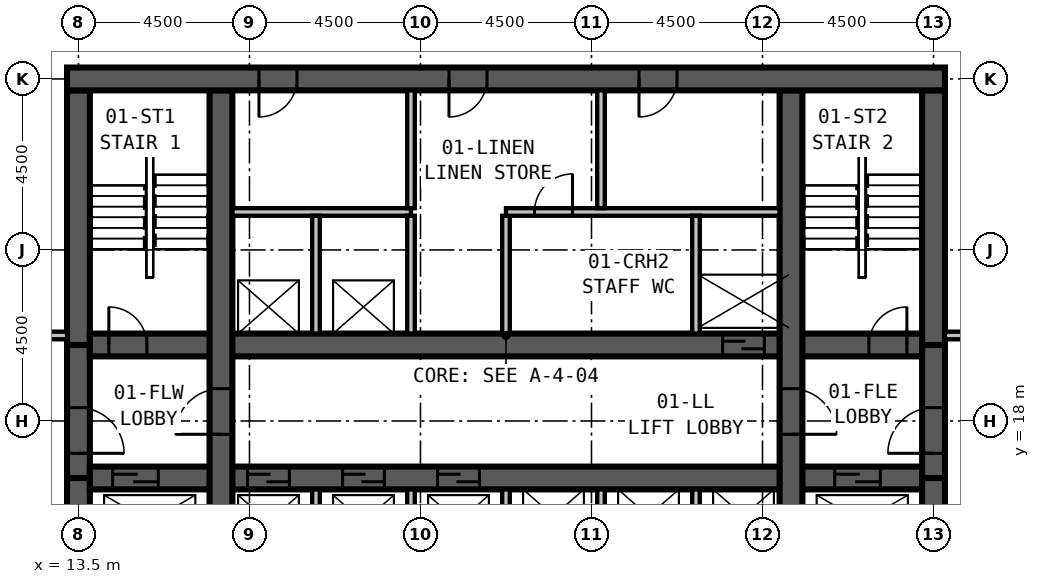
"""IFC4 building model, lengths in metres.
Left out: names, types, materials, properties, quantities, classifications, styles, units other than length and angle.
Written with IfcOpenShell. Run it as: python <this file> out.ifc"""

import sys

from ifc_helpers import new_model, si_unit, direction, frame, frame_2d, origin, place, context, subcontext, project, spatial, rectangle, extrude, element, fill, save


model = new_model("IFC4")
c1 = context("Model", 3, precision=1e-05, world=origin(), true_north=direction((0.0, 1.0)))
c2 = subcontext(c1, "Body", "Model", "MODEL_VIEW")
j1 = project(units=[si_unit("LENGTHUNIT", "METRE"), si_unit("PLANEANGLEUNIT", "RADIAN")], contexts=[c1])
p1 = place(None, origin())
s1 = spatial("IfcSite", under=j1, at=p1, CompositionType="ELEMENT")
p2 = place(p1, origin())
s2 = spatial("IfcBuilding", under=s1, at=p2, CompositionType="ELEMENT")
p3 = place(p2, frame((0.0, 0.0, 6.0)))
s3 = spatial("IfcBuildingStorey", under=s2, at=p3, CompositionType="ELEMENT", Elevation=6.0)
p4 = place(p3, frame((36.3, 27.0, 0.0), z_axis=(0.0, 0.0, 1.0), x_axis=(-1.0, 0.0, 0.0)))
e1 = element("IfcWall", 1, at=p4, inside=s3, PredefinedType="SHEAR", context=c2, shape_type="SweptSolid", body=[
    extrude(rectangle(XDim=23.1, YDim=0.6, at=frame_2d((11.55, 0.0))), origin(), (0.0, 0.0, 1.0), 5.0),
])
p5 = place(p4, frame((17.05, 0.0, 0.0)))
e2 = element("IfcOpeningElement", 2, at=p5, cuts=e1, PredefinedType="OPENING", context=c2, shape_type="SweptSolid", body=[
    extrude(rectangle(XDim=1.0, YDim=2.1, at=frame_2d((0.5, 1.05))), frame((0.0, 0.31, 0.0), z_axis=(0.0, -1.0, 0.0), x_axis=(1.0, 0.0, 0.0)), (0.0, 0.0, 1.0), 0.62),
])
p6 = place(p4, frame((12.05, 0.0, 0.0)))
e3 = element("IfcOpeningElement", 3, at=p6, cuts=e1, PredefinedType="OPENING", context=c2, shape_type="SweptSolid", body=[
    extrude(rectangle(XDim=1.0, YDim=2.1, at=frame_2d((0.5, 1.05))), frame((0.0, 0.31, 0.0), z_axis=(0.0, -1.0, 0.0), x_axis=(1.0, 0.0, 0.0)), (0.0, 0.0, 1.0), 0.62),
])
p7 = place(p4, frame((7.05, 0.0, 0.0)))
e4 = element("IfcOpeningElement", 4, at=p7, cuts=e1, PredefinedType="OPENING", context=c2, shape_type="SweptSolid", body=[
    extrude(rectangle(XDim=1.0, YDim=2.1, at=frame_2d((0.5, 1.05))), frame((0.0, 0.31, 0.0), z_axis=(0.0, -1.0, 0.0), x_axis=(1.0, 0.0, 0.0)), (0.0, 0.0, 1.0), 0.62),
])
p8 = place(p3, frame((17.25, 13.8, 0.0), z_axis=(0.0, 0.0, 1.0), x_axis=(0.0, 1.0, 0.0)))
e5 = element("IfcWall", 5, at=p8, inside=s3, PredefinedType="SHEAR", context=c2, shape_type="SweptSolid", body=[
    extrude(rectangle(XDim=12.9, YDim=0.6, at=frame_2d((6.45, 0.0))), origin(), (0.0, 0.0, 1.0), 5.0),
])
p9 = place(p8, frame((3.85, 0.0, 0.0)))
e6 = element("IfcOpeningElement", 6, at=p9, cuts=e5, PredefinedType="OPENING", context=c2, shape_type="SweptSolid", body=[
    extrude(rectangle(XDim=1.2, YDim=2.1, at=frame_2d((0.6, 1.05))), frame((0.0, 0.31, 0.0), z_axis=(0.0, -1.0, 0.0), x_axis=(1.0, 0.0, 0.0)), (0.0, 0.0, 1.0), 0.62),
])
p10 = place(p3, frame((32.25, 13.8, 0.0), z_axis=(0.0, 0.0, 1.0), x_axis=(0.0, 1.0, 0.0)))
e7 = element("IfcWall", 7, at=p10, inside=s3, PredefinedType="SHEAR", context=c2, shape_type="SweptSolid", body=[
    extrude(rectangle(XDim=12.9, YDim=0.6, at=frame_2d((6.45, 0.0))), origin(), (0.0, 0.0, 1.0), 5.0),
])
p11 = place(p10, frame((5.05, 0.0, 0.0), z_axis=(0.0, 0.0, 1.0), x_axis=(-1.0, 0.0, 0.0)))
e8 = element("IfcOpeningElement", 8, at=p11, cuts=e7, PredefinedType="OPENING", context=c2, shape_type="SweptSolid", body=[
    extrude(rectangle(XDim=1.2, YDim=2.1, at=frame_2d((0.6, 1.05))), frame((0.0, 0.31, 0.0), z_axis=(0.0, -1.0, 0.0), x_axis=(1.0, 0.0, 0.0)), (0.0, 0.0, 1.0), 0.62),
])
p12 = place(p3, frame((13.8, 16.5, 0.0), z_axis=(0.0, 0.0, 1.0), x_axis=(1.0, 0.0, 0.0)))
e9 = element("IfcWall", 9, at=p12, inside=s3, PredefinedType="SHEAR", context=c2, shape_type="SweptSolid", body=[
    extrude(rectangle(XDim=21.9, YDim=0.6, at=frame_2d((10.95, 0.0))), origin(), (0.0, 0.0, 1.0), 5.0),
])
p13 = place(p12, frame((4.15, 0.0, 0.0)))
e10 = element("IfcOpeningElement", 10, at=p13, cuts=e9, PredefinedType="OPENING", context=c2, shape_type="SweptSolid", body=[
    extrude(rectangle(XDim=1.1, YDim=2.1, at=frame_2d((0.55, 1.05))), frame((0.0, 0.31, 0.0), z_axis=(0.0, -1.0, 0.0), x_axis=(1.0, 0.0, 0.0)), (0.0, 0.0, 1.0), 0.62),
])
p14 = place(p12, frame((6.65, 0.0, 0.0)))
e11 = element("IfcOpeningElement", 11, at=p14, cuts=e9, PredefinedType="OPENING", context=c2, shape_type="SweptSolid", body=[
    extrude(rectangle(XDim=1.1, YDim=2.1, at=frame_2d((0.55, 1.05))), frame((0.0, 0.31, 0.0), z_axis=(0.0, -1.0, 0.0), x_axis=(1.0, 0.0, 0.0)), (0.0, 0.0, 1.0), 0.62),
])
p15 = place(p12, frame((9.15, 0.0, 0.0)))
e12 = element("IfcOpeningElement", 12, at=p15, cuts=e9, PredefinedType="OPENING", context=c2, shape_type="SweptSolid", body=[
    extrude(rectangle(XDim=1.1, YDim=2.1, at=frame_2d((0.55, 1.05))), frame((0.0, 0.31, 0.0), z_axis=(0.0, -1.0, 0.0), x_axis=(1.0, 0.0, 0.0)), (0.0, 0.0, 1.0), 0.62),
])
p16 = place(p12, frame((0.6, 0.0, 0.0)))
e13 = element("IfcOpeningElement", 13, at=p16, cuts=e9, PredefinedType="OPENING", context=c2, shape_type="SweptSolid", body=[
    extrude(rectangle(XDim=1.2, YDim=2.1, at=frame_2d((0.6, 1.05))), frame((0.0, 0.31, 0.0), z_axis=(0.0, -1.0, 0.0), x_axis=(1.0, 0.0, 0.0)), (0.0, 0.0, 1.0), 0.62),
])
p17 = place(p12, frame((19.6, 0.0, 0.0)))
e14 = element("IfcOpeningElement", 14, at=p17, cuts=e9, PredefinedType="OPENING", context=c2, shape_type="SweptSolid", body=[
    extrude(rectangle(XDim=1.2, YDim=2.1, at=frame_2d((0.6, 1.05))), frame((0.0, 0.31, 0.0), z_axis=(0.0, -1.0, 0.0), x_axis=(1.0, 0.0, 0.0)), (0.0, 0.0, 1.0), 0.62),
])
p18 = place(p3, frame((13.8, 20.0, 0.0), z_axis=(0.0, 0.0, 1.0), x_axis=(1.0, 0.0, 0.0)))
e15 = element("IfcWall", 15, at=p18, inside=s3, PredefinedType="SHEAR", context=c2, shape_type="SweptSolid", body=[
    extrude(rectangle(XDim=21.9, YDim=0.6, at=frame_2d((10.95, 0.0))), origin(), (0.0, 0.0, 1.0), 5.0),
])
p19 = place(p18, frame((0.5, 0.0, 0.0)))
e16 = element("IfcOpeningElement", 16, at=p19, cuts=e15, PredefinedType="OPENING", context=c2, shape_type="SweptSolid", body=[
    extrude(rectangle(XDim=1.0, YDim=2.1, at=frame_2d((0.5, 1.05))), frame((0.0, 0.31, 0.0), z_axis=(0.0, -1.0, 0.0), x_axis=(1.0, 0.0, 0.0)), (0.0, 0.0, 1.0), 0.62),
])
p20 = place(p18, frame((20.5, 0.0, 0.0)))
e17 = element("IfcOpeningElement", 17, at=p20, cuts=e15, PredefinedType="OPENING", context=c2, shape_type="SweptSolid", body=[
    extrude(rectangle(XDim=1.0, YDim=2.1, at=frame_2d((0.5, 1.05))), frame((0.0, 0.31, 0.0), z_axis=(0.0, -1.0, 0.0), x_axis=(1.0, 0.0, 0.0)), (0.0, 0.0, 1.0), 0.62),
])
p21 = place(p18, frame((16.65, 0.0, 0.0)))
e18 = element("IfcOpeningElement", 18, at=p21, cuts=e15, PredefinedType="OPENING", context=c2, shape_type="SweptSolid", body=[
    extrude(rectangle(XDim=1.1, YDim=2.1, at=frame_2d((0.55, 1.05))), frame((0.0, 0.31, 0.0), z_axis=(0.0, -1.0, 0.0), x_axis=(1.0, 0.0, 0.0)), (0.0, 0.0, 1.0), 0.62),
])
p22 = place(p3, frame((13.5, 26.7, 0.0), z_axis=(0.0, 0.0, 1.0), x_axis=(0.0, -1.0, 0.0)))
e19 = element("IfcWall", 19, at=p22, inside=s3, PredefinedType="SHEAR", context=c2, shape_type="SweptSolid", body=[
    extrude(rectangle(XDim=6.7, YDim=0.6, at=frame_2d((3.35, 0.0))), origin(), (0.0, 0.0, 1.0), 5.0),
])
p23 = place(p3, frame((13.5, 20.0, 0.0), z_axis=(0.0, 0.0, 1.0), x_axis=(0.0, -1.0, 0.0)))
e20 = element("IfcWall", 20, at=p23, inside=s3, PredefinedType="SHEAR", context=c2, shape_type="SweptSolid", body=[
    extrude(rectangle(XDim=3.5, YDim=0.6, at=frame_2d((1.75, 0.0))), origin(), (0.0, 0.0, 1.0), 5.0),
])
p24 = place(p23, frame((1.65, 0.0, 0.0)))
e21 = element("IfcOpeningElement", 21, at=p24, cuts=e20, PredefinedType="OPENING", context=c2, shape_type="SweptSolid", body=[
    extrude(rectangle(XDim=1.2, YDim=2.1, at=frame_2d((0.6, 1.05))), frame((0.0, 0.31, 0.0), z_axis=(0.0, -1.0, 0.0), x_axis=(1.0, 0.0, 0.0)), (0.0, 0.0, 1.0), 0.62),
])
for number, where, z_axis, x_axis in (
    (22, (13.5, 16.5, 0.0), (0.0, 0.0, 1.0), (0.0, -1.0, 0.0)),
    (23, (36.0, 13.8, 0.0), (0.0, 0.0, 1.0), (0.0, 1.0, 0.0)),
):
    element("IfcWall", number, at=place(p3, frame(where, z_axis=z_axis, x_axis=x_axis)), inside=s3, PredefinedType="SHEAR", context=c2, shape_type="SweptSolid", body=[
        extrude(rectangle(XDim=2.7, YDim=0.6, at=frame_2d((1.35, 0.0))), origin(), (0.0, 0.0, 1.0), 5.0),
    ])
p25 = place(p3, frame((36.0, 16.5, 0.0), z_axis=(0.0, 0.0, 1.0), x_axis=(0.0, 1.0, 0.0)))
e24 = element("IfcWall", 24, at=p25, inside=s3, PredefinedType="SHEAR", context=c2, shape_type="SweptSolid", body=[
    extrude(rectangle(XDim=3.5, YDim=0.6, at=frame_2d((1.75, 0.0))), origin(), (0.0, 0.0, 1.0), 5.0),
])
p26 = place(p25, frame((0.65, 0.0, 0.0)))
e25 = element("IfcOpeningElement", 25, at=p26, cuts=e24, PredefinedType="OPENING", context=c2, shape_type="SweptSolid", body=[
    extrude(rectangle(XDim=1.2, YDim=2.1, at=frame_2d((0.6, 1.05))), frame((0.0, 0.31, 0.0), z_axis=(0.0, -1.0, 0.0), x_axis=(1.0, 0.0, 0.0)), (0.0, 0.0, 1.0), 0.62),
])
p27 = place(p3, frame((36.0, 20.0, 0.0), z_axis=(0.0, 0.0, 1.0), x_axis=(0.0, 1.0, 0.0)))
e26 = element("IfcWall", 26, at=p27, inside=s3, PredefinedType="SHEAR", context=c2, shape_type="SweptSolid", body=[
    extrude(rectangle(XDim=6.7, YDim=0.6, at=frame_2d((3.35, 0.0))), origin(), (0.0, 0.0, 1.0), 5.0),
])
p28 = place(p3, frame((-0.9, 20.25, 0.0), z_axis=(0.0, 0.0, 1.0), x_axis=(1.0, 0.0, 0.0)))
e27 = element("IfcWall", 27, at=p28, inside=s3, PredefinedType="PARTITIONING", context=c2, shape_type="SweptSolid", body=[
    extrude(rectangle(XDim=14.1, YDim=0.2, at=frame_2d((7.05, 0.0))), origin(), (0.0, 0.0, 1.0), 4.7),
])
p29 = place(p28, frame((5.0, 0.0, 0.0)))
e28 = element("IfcOpeningElement", 28, at=p29, cuts=e27, PredefinedType="OPENING", context=c2, shape_type="SweptSolid", body=[
    extrude(rectangle(XDim=1.8, YDim=2.4, at=frame_2d((0.9, 1.2))), frame((0.0, 0.11, 0.0), z_axis=(0.0, -1.0, 0.0), x_axis=(1.0, 0.0, 0.0)), (0.0, 0.0, 1.0), 0.22),
])
p30 = place(p3, frame((36.3, 20.25, 0.0), z_axis=(0.0, 0.0, 1.0), x_axis=(1.0, 0.0, 0.0)))
e29 = element("IfcWall", 29, at=p30, inside=s3, PredefinedType="PARTITIONING", context=c2, shape_type="SweptSolid", body=[
    extrude(rectangle(XDim=13.2, YDim=0.2, at=frame_2d((6.6, 0.0))), origin(), (0.0, 0.0, 1.0), 4.7),
])
p31 = place(p30, frame((4.0, 0.0, 0.0)))
e30 = element("IfcOpeningElement", 30, at=p31, cuts=e29, PredefinedType="OPENING", context=c2, shape_type="SweptSolid", body=[
    extrude(rectangle(XDim=1.8, YDim=2.4, at=frame_2d((0.9, 1.2))), frame((0.0, 0.11, 0.0), z_axis=(0.0, -1.0, 0.0), x_axis=(1.0, 0.0, 0.0)), (0.0, 0.0, 1.0), 0.22),
])
p32 = place(p3, frame((19.75, 13.8, 0.0), z_axis=(0.0, 0.0, 1.0), x_axis=(0.0, 1.0, 0.0)))
e31 = element("IfcWall", 31, at=p32, inside=s3, PredefinedType="PARTITIONING", context=c2, shape_type="SweptSolid", body=[
    extrude(rectangle(XDim=2.4, YDim=0.2, at=frame_2d((1.2, 0.0))), origin(), (0.0, 0.0, 1.0), 4.7),
])
p33 = place(p3, frame((19.75, 20.3, 0.0), z_axis=(0.0, 0.0, 1.0), x_axis=(0.0, 1.0, 0.0)))
e32 = element("IfcWall", 32, at=p33, inside=s3, PredefinedType="PARTITIONING", context=c2, shape_type="SweptSolid", body=[
    extrude(rectangle(XDim=3.1, YDim=0.2, at=frame_2d((1.55, 0.0))), origin(), (0.0, 0.0, 1.0), 4.7),
])
p34 = place(p3, frame((22.25, 13.8, 0.0), z_axis=(0.0, 0.0, 1.0), x_axis=(0.0, 1.0, 0.0)))
e33 = element("IfcWall", 33, at=p34, inside=s3, PredefinedType="PARTITIONING", context=c2, shape_type="SweptSolid", body=[
    extrude(rectangle(XDim=2.4, YDim=0.2, at=frame_2d((1.2, 0.0))), origin(), (0.0, 0.0, 1.0), 4.7),
])
p35 = place(p3, frame((22.25, 20.3, 0.0), z_axis=(0.0, 0.0, 1.0), x_axis=(0.0, 1.0, 0.0)))
e34 = element("IfcWall", 34, at=p35, inside=s3, PredefinedType="PARTITIONING", context=c2, shape_type="SweptSolid", body=[
    extrude(rectangle(XDim=3.1, YDim=0.2, at=frame_2d((1.55, 0.0))), origin(), (0.0, 0.0, 1.0), 4.7),
])
p36 = place(p3, frame((24.75, 13.8, 0.0), z_axis=(0.0, 0.0, 1.0), x_axis=(0.0, 1.0, 0.0)))
e35 = element("IfcWall", 35, at=p36, inside=s3, PredefinedType="PARTITIONING", context=c2, shape_type="SweptSolid", body=[
    extrude(rectangle(XDim=2.4, YDim=0.2, at=frame_2d((1.2, 0.0))), origin(), (0.0, 0.0, 1.0), 4.7),
])
p37 = place(p3, frame((24.75, 20.3, 0.0), z_axis=(0.0, 0.0, 1.0), x_axis=(0.0, 1.0, 0.0)))
e36 = element("IfcWall", 36, at=p37, inside=s3, PredefinedType="PARTITIONING", context=c2, shape_type="SweptSolid", body=[
    extrude(rectangle(XDim=3.1, YDim=0.2, at=frame_2d((1.55, 0.0))), origin(), (0.0, 0.0, 1.0), 4.7),
])
for number, where, z_axis, x_axis in (
    (37, (27.25, 13.8, 0.0), (0.0, 0.0, 1.0), (0.0, 1.0, 0.0)),
    (38, (29.75, 13.8, 0.0), (0.0, 0.0, 1.0), (0.0, 1.0, 0.0)),
):
    element("IfcWall", number, at=place(p3, frame(where, z_axis=z_axis, x_axis=x_axis)), inside=s3, PredefinedType="PARTITIONING", context=c2, shape_type="SweptSolid", body=[
        extrude(rectangle(XDim=2.4, YDim=0.2, at=frame_2d((1.2, 0.0))), origin(), (0.0, 0.0, 1.0), 4.7),
    ])
p38 = place(p3, frame((29.75, 20.3, 0.0), z_axis=(0.0, 0.0, 1.0), x_axis=(0.0, 1.0, 0.0)))
e39 = element("IfcWall", 39, at=p38, inside=s3, PredefinedType="PARTITIONING", context=c2, shape_type="SweptSolid", body=[
    extrude(rectangle(XDim=3.1, YDim=0.2, at=frame_2d((1.55, 0.0))), origin(), (0.0, 0.0, 1.0), 4.7),
])
p39 = place(p3, frame((17.55, 23.5, 0.0), z_axis=(0.0, 0.0, 1.0), x_axis=(1.0, 0.0, 0.0)))
e40 = element("IfcWall", 40, at=p39, inside=s3, PredefinedType="PARTITIONING", context=c2, shape_type="SweptSolid", body=[
    extrude(rectangle(XDim=4.7, YDim=0.2, at=frame_2d((2.35, 0.0))), origin(), (0.0, 0.0, 1.0), 4.7),
])
p40 = place(p3, frame((24.75, 23.5, 0.0), z_axis=(0.0, 0.0, 1.0), x_axis=(1.0, 0.0, 0.0)))
e41 = element("IfcWall", 41, at=p40, inside=s3, PredefinedType="PARTITIONING", context=c2, shape_type="SweptSolid", body=[
    extrude(rectangle(XDim=7.2, YDim=0.2, at=frame_2d((3.6, 0.0))), origin(), (0.0, 0.0, 1.0), 4.7),
])
p41 = place(p40, frame((0.75, 0.0, 0.0)))
e42 = element("IfcOpeningElement", 42, at=p41, cuts=e41, PredefinedType="OPENING", context=c2, shape_type="SweptSolid", body=[
    extrude(rectangle(XDim=1.0, YDim=2.1, at=frame_2d((0.5, 1.05))), frame((0.0, 0.11, 0.0), z_axis=(0.0, -1.0, 0.0), x_axis=(1.0, 0.0, 0.0)), (0.0, 0.0, 1.0), 0.22),
])
for number, where, z_axis, x_axis in (
    (43, (22.25, 23.6, 0.0), (0.0, 0.0, 1.0), (0.0, 1.0, 0.0)),
    (44, (27.25, 23.6, 0.0), (0.0, 0.0, 1.0), (0.0, 1.0, 0.0)),
):
    element("IfcWall", number, at=place(p3, frame(where, z_axis=z_axis, x_axis=x_axis)), inside=s3, PredefinedType="PARTITIONING", context=c2, shape_type="SweptSolid", body=[
        extrude(rectangle(XDim=3.1, YDim=0.2, at=frame_2d((1.55, 0.0))), origin(), (0.0, 0.0, 1.0), 4.7),
    ])
p42 = place(p41, origin())
e45 = element("IfcDoor", 45, at=p42, inside=s3, OperationType="SINGLE_SWING_RIGHT", PredefinedType="DOOR", context=c2, shape_type="SweptSolid", body=[
    extrude(rectangle(XDim=1.0, YDim=2.1, at=frame_2d((0.5, 1.05))), frame((0.0, 0.025, 0.0), z_axis=(0.0, -1.0, 0.0), x_axis=(1.0, 0.0, 0.0)), (0.0, 0.0, 1.0), 0.05),
])
fill(e42, e45)
p43 = place(p24, origin())
e46 = element("IfcDoor", 46, at=p43, inside=s3, OperationType="SINGLE_SWING_RIGHT", PredefinedType="DOOR", context=c2, shape_type="SweptSolid", body=[
    extrude(rectangle(XDim=1.2, YDim=2.1, at=frame_2d((0.6, 1.05))), frame((0.0, 0.3, 0.0), z_axis=(0.0, -1.0, 0.0), x_axis=(1.0, 0.0, 0.0)), (0.0, 0.0, 1.0), 0.6),
])
fill(e21, e46)
p44 = place(p26, origin())
e47 = element("IfcDoor", 47, at=p44, inside=s3, OperationType="SINGLE_SWING_LEFT", PredefinedType="DOOR", context=c2, shape_type="SweptSolid", body=[
    extrude(rectangle(XDim=1.2, YDim=2.1, at=frame_2d((0.6, 1.05))), frame((0.0, 0.3, 0.0), z_axis=(0.0, -1.0, 0.0), x_axis=(1.0, 0.0, 0.0)), (0.0, 0.0, 1.0), 0.6),
])
fill(e25, e47)
p45 = place(p9, origin())
e48 = element("IfcDoor", 48, at=p45, inside=s3, OperationType="SINGLE_SWING_LEFT", PredefinedType="DOOR", context=c2, shape_type="SweptSolid", body=[
    extrude(rectangle(XDim=1.2, YDim=2.1, at=frame_2d((0.6, 1.05))), frame((0.0, 0.3, 0.0), z_axis=(0.0, -1.0, 0.0), x_axis=(1.0, 0.0, 0.0)), (0.0, 0.0, 1.0), 0.6),
])
fill(e6, e48)
p46 = place(p11, origin())
e49 = element("IfcDoor", 49, at=p46, inside=s3, OperationType="SINGLE_SWING_RIGHT", PredefinedType="DOOR", context=c2, shape_type="SweptSolid", body=[
    extrude(rectangle(XDim=1.2, YDim=2.1, at=frame_2d((0.6, 1.05))), frame((0.0, 0.3, 0.0), z_axis=(0.0, -1.0, 0.0), x_axis=(1.0, 0.0, 0.0)), (0.0, 0.0, 1.0), 0.6),
])
fill(e8, e49)
p47 = place(p19, origin())
e50 = element("IfcDoor", 50, at=p47, inside=s3, OperationType="SINGLE_SWING_LEFT", PredefinedType="DOOR", context=c2, shape_type="SweptSolid", body=[
    extrude(rectangle(XDim=1.0, YDim=2.1, at=frame_2d((0.5, 1.05))), frame((0.0, 0.3, 0.0), z_axis=(0.0, -1.0, 0.0), x_axis=(1.0, 0.0, 0.0)), (0.0, 0.0, 1.0), 0.6),
])
fill(e16, e50)
p48 = place(p20, origin())
e51 = element("IfcDoor", 51, at=p48, inside=s3, OperationType="SINGLE_SWING_RIGHT", PredefinedType="DOOR", context=c2, shape_type="SweptSolid", body=[
    extrude(rectangle(XDim=1.0, YDim=2.1, at=frame_2d((0.5, 1.05))), frame((0.0, 0.3, 0.0), z_axis=(0.0, -1.0, 0.0), x_axis=(1.0, 0.0, 0.0)), (0.0, 0.0, 1.0), 0.6),
])
fill(e17, e51)
p49 = place(p13, origin())
e52 = element("IfcDoor", 52, at=p49, inside=s3, OperationType="SLIDING_TO_LEFT", PredefinedType="DOOR", context=c2, shape_type="SweptSolid", body=[
    extrude(rectangle(XDim=1.1, YDim=2.1, at=frame_2d((0.55, 1.05))), frame((0.0, 0.3, 0.0), z_axis=(0.0, -1.0, 0.0), x_axis=(1.0, 0.0, 0.0)), (0.0, 0.0, 1.0), 0.6),
])
fill(e10, e52)
p50 = place(p14, origin())
e53 = element("IfcDoor", 53, at=p50, inside=s3, OperationType="SLIDING_TO_LEFT", PredefinedType="DOOR", context=c2, shape_type="SweptSolid", body=[
    extrude(rectangle(XDim=1.1, YDim=2.1, at=frame_2d((0.55, 1.05))), frame((0.0, 0.3, 0.0), z_axis=(0.0, -1.0, 0.0), x_axis=(1.0, 0.0, 0.0)), (0.0, 0.0, 1.0), 0.6),
])
fill(e11, e53)
p51 = place(p15, origin())
e54 = element("IfcDoor", 54, at=p51, inside=s3, OperationType="SLIDING_TO_LEFT", PredefinedType="DOOR", context=c2, shape_type="SweptSolid", body=[
    extrude(rectangle(XDim=1.1, YDim=2.1, at=frame_2d((0.55, 1.05))), frame((0.0, 0.3, 0.0), z_axis=(0.0, -1.0, 0.0), x_axis=(1.0, 0.0, 0.0)), (0.0, 0.0, 1.0), 0.6),
])
fill(e12, e54)
p52 = place(p21, origin())
e55 = element("IfcDoor", 55, at=p52, inside=s3, OperationType="SLIDING_TO_LEFT", PredefinedType="DOOR", context=c2, shape_type="SweptSolid", body=[
    extrude(rectangle(XDim=1.1, YDim=2.1, at=frame_2d((0.55, 1.05))), frame((0.0, 0.3, 0.0), z_axis=(0.0, -1.0, 0.0), x_axis=(1.0, 0.0, 0.0)), (0.0, 0.0, 1.0), 0.6),
])
fill(e18, e55)
p53 = place(p16, origin())
e56 = element("IfcDoor", 56, at=p53, inside=s3, OperationType="SLIDING_TO_LEFT", PredefinedType="DOOR", context=c2, shape_type="SweptSolid", body=[
    extrude(rectangle(XDim=1.2, YDim=2.1, at=frame_2d((0.6, 1.05))), frame((0.0, 0.3, 0.0), z_axis=(0.0, -1.0, 0.0), x_axis=(1.0, 0.0, 0.0)), (0.0, 0.0, 1.0), 0.6),
])
fill(e13, e56)
p54 = place(p17, origin())
e57 = element("IfcDoor", 57, at=p54, inside=s3, OperationType="SLIDING_TO_LEFT", PredefinedType="DOOR", context=c2, shape_type="SweptSolid", body=[
    extrude(rectangle(XDim=1.2, YDim=2.1, at=frame_2d((0.6, 1.05))), frame((0.0, 0.3, 0.0), z_axis=(0.0, -1.0, 0.0), x_axis=(1.0, 0.0, 0.0)), (0.0, 0.0, 1.0), 0.6),
])
fill(e14, e57)
p55 = place(p5, origin())
e58 = element("IfcDoor", 58, at=p55, inside=s3, OperationType="SINGLE_SWING_RIGHT", PredefinedType="DOOR", context=c2, shape_type="SweptSolid", body=[
    extrude(rectangle(XDim=1.0, YDim=2.1, at=frame_2d((0.5, 1.05))), frame((0.0, 0.3, 0.0), z_axis=(0.0, -1.0, 0.0), x_axis=(1.0, 0.0, 0.0)), (0.0, 0.0, 1.0), 0.6),
])
fill(e2, e58)
p56 = place(p6, origin())
e59 = element("IfcDoor", 59, at=p56, inside=s3, OperationType="SINGLE_SWING_RIGHT", PredefinedType="DOOR", context=c2, shape_type="SweptSolid", body=[
    extrude(rectangle(XDim=1.0, YDim=2.1, at=frame_2d((0.5, 1.05))), frame((0.0, 0.3, 0.0), z_axis=(0.0, -1.0, 0.0), x_axis=(1.0, 0.0, 0.0)), (0.0, 0.0, 1.0), 0.6),
])
fill(e3, e59)
p57 = place(p7, origin())
e60 = element("IfcDoor", 60, at=p57, inside=s3, OperationType="SINGLE_SWING_RIGHT", PredefinedType="DOOR", context=c2, shape_type="SweptSolid", body=[
    extrude(rectangle(XDim=1.0, YDim=2.1, at=frame_2d((0.5, 1.05))), frame((0.0, 0.3, 0.0), z_axis=(0.0, -1.0, 0.0), x_axis=(1.0, 0.0, 0.0)), (0.0, 0.0, 1.0), 0.6),
])
fill(e4, e60)
save(model, sys.argv[1])
